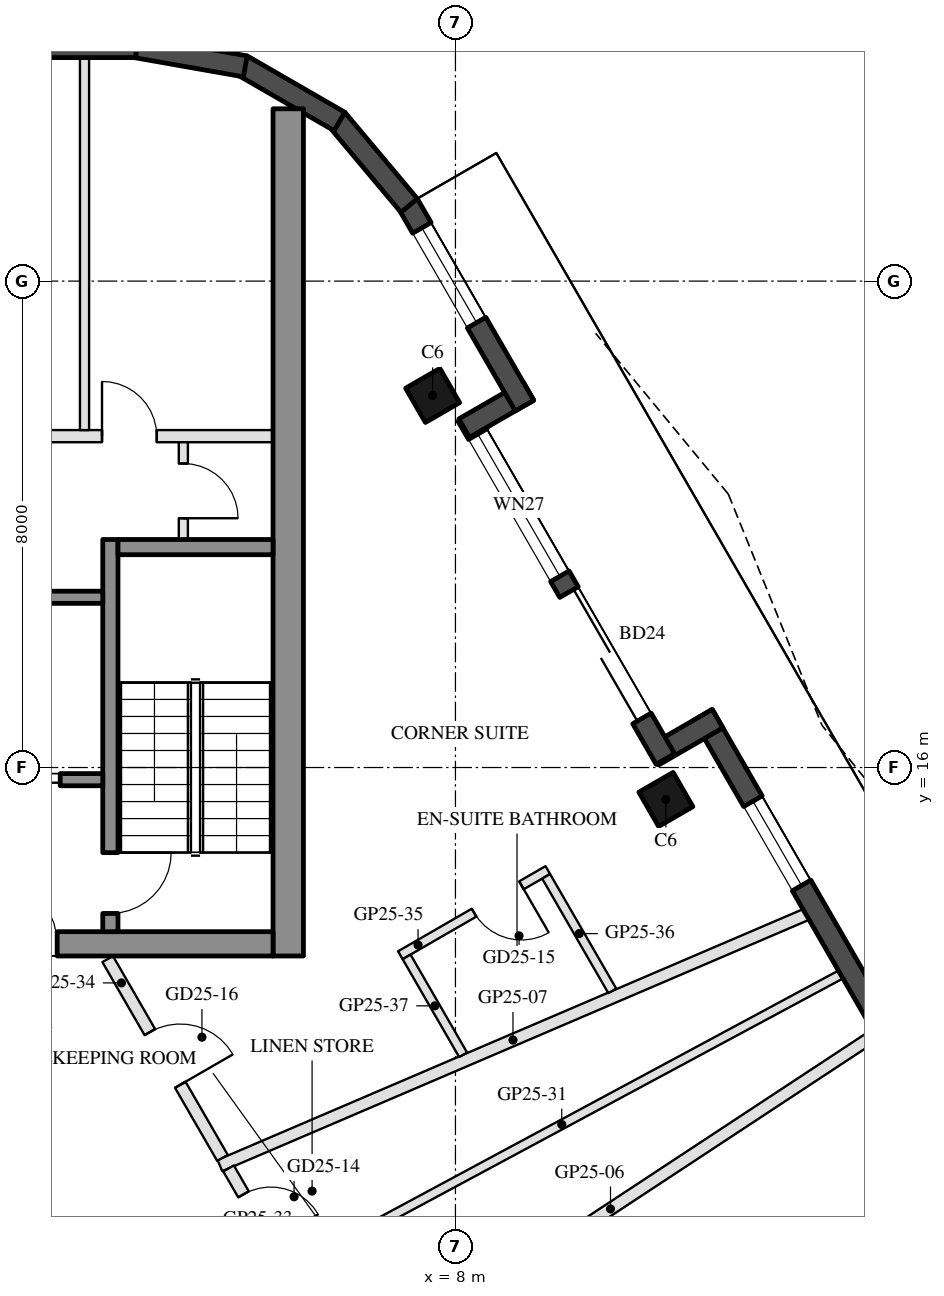
"""IFC4 building model, lengths in metres.
Left out: names, types, materials, properties, quantities, classifications, styles, units other than length and angle.
Written with IfcOpenShell. Run it as: python <this file> out.ifc"""

import sys

from ifc_helpers import new_model, si_unit, direction, frame, frame_2d, origin, origin_2d, place, context, subcontext, project, spatial, rectangle, hollow_rectangle, extrude, boolean, halfspace, element, fill, save


model = new_model("IFC4")
c1 = context("Model", 3, precision=1e-05, world=origin(), true_north=direction((0.0, 1.0)))
c2 = subcontext(c1, "Body", "Model", "MODEL_VIEW")
j1 = project(units=[si_unit("LENGTHUNIT", "METRE"), si_unit("PLANEANGLEUNIT", "RADIAN")], contexts=[c1])
p1 = place(None, origin())
s1 = spatial("IfcSite", under=j1, at=p1, CompositionType="ELEMENT")
p2 = place(p1, origin())
s2 = spatial("IfcBuilding", under=s1, at=p2, CompositionType="ELEMENT")
p3 = place(p2, frame((0.0, 0.0, 261.5)))
s3 = spatial("IfcBuildingStorey", under=s2, at=p3, CompositionType="ELEMENT", Elevation=261.5)
p4 = place(p3, frame((11.461, 15.475, 0.0), z_axis=(0.0, 0.0, 1.0), x_axis=(-0.5, 0.866025403784, 0.0)))
e1 = element("IfcColumn", 1, at=p4, inside=s3, PredefinedType="COLUMN", context=c2, shape_type="SweptSolid", body=[
    boolean("DIFFERENCE", extrude(hollow_rectangle(XDim=0.65, YDim=0.65, WallThickness=0.03, at=origin_2d()), origin(), (0.0, 0.0, 1.0), 3.7), halfspace(frame((0.0, 0.0, 3.66), z_axis=(0.0, 0.0, 1.0), x_axis=(1.0, 0.0, 0.0)), False)),
])
p5 = place(p3, frame((7.625, 22.119, 0.0), z_axis=(0.0, 0.0, 1.0), x_axis=(-0.5, 0.866025403784, 0.0)))
e2 = element("IfcColumn", 2, at=p5, inside=s3, PredefinedType="COLUMN", context=c2, shape_type="SweptSolid", body=[
    boolean("DIFFERENCE", extrude(hollow_rectangle(XDim=0.65, YDim=0.65, WallThickness=0.03, at=origin_2d()), origin(), (0.0, 0.0, 1.0), 3.7), halfspace(frame((0.0, 0.0, 3.653), z_axis=(0.0, 0.0, 1.0), x_axis=(1.0, 0.0, 0.0)), False)),
])
p6 = place(p3, frame((16.807, 8.665, 0.0), z_axis=(0.0, 0.0, 1.0), x_axis=(-0.499992427901, 0.866029775494, 0.0)))
e3 = element("IfcWall", 3, at=p6, inside=s3, PredefinedType="SOLIDWALL", context=c2, shape_type="SweptSolid", body=[
    extrude(rectangle(XDim=9.472, YDim=0.35, at=frame_2d((4.736, 0.0))), origin(), (0.0, 0.0, 1.0), 3.55),
])
p7 = place(p6, frame((1.612, 0.0, 0.0)))
e4 = element("IfcOpeningElement", 4, at=p7, cuts=e3, PredefinedType="OPENING", context=c2, shape_type="SweptSolid", body=[
    extrude(rectangle(XDim=1.4, YDim=2.4, at=frame_2d((0.7, 1.2))), frame((0.0, 0.185, 0.0), z_axis=(0.0, -1.0, 0.0), x_axis=(1.0, 0.0, 0.0)), (0.0, 0.0, 1.0), 0.37),
])
p8 = place(p6, frame((6.23, 0.0, 0.3)))
e5 = element("IfcOpeningElement", 5, at=p8, cuts=e3, PredefinedType="OPENING", context=c2, shape_type="SweptSolid", body=[
    extrude(rectangle(XDim=1.6, YDim=2.65, at=frame_2d((0.8, 1.325))), frame((0.0, 0.185, 0.0), z_axis=(0.0, -1.0, 0.0), x_axis=(1.0, 0.0, 0.0)), (0.0, 0.0, 1.0), 0.37),
])
p9 = place(p3, frame((12.311, 16.803, 0.0), z_axis=(0.0, 0.0, 1.0), x_axis=(-0.866005645448, -0.500034220881, 0.0)))
e6 = element("IfcWall", 6, at=p9, inside=s3, PredefinedType="SOLIDWALL", context=c2, shape_type="SweptSolid", body=[
    extrude(rectangle(XDim=1.22, YDim=0.35, at=frame_2d((0.61, 0.0))), origin(), (0.0, 0.0, 1.0), 3.55),
])
p10 = place(p3, frame((11.452, 16.14, 0.0), z_axis=(0.0, 0.0, 1.0), x_axis=(-0.49998210071, 0.866035737698, 0.0)))
e7 = element("IfcWall", 7, at=p10, inside=s3, PredefinedType="SOLIDWALL", context=c2, shape_type="SweptSolid", body=[
    extrude(rectangle(XDim=6.511, YDim=0.35, at=frame_2d((3.256, 0.0))), origin(), (0.0, 0.0, 1.0), 3.55),
])
p11 = place(p10, frame((0.77, 0.0, 0.0)))
e8 = element("IfcOpeningElement", 8, at=p11, cuts=e7, PredefinedType="OPENING", context=c2, shape_type="SweptSolid", body=[
    extrude(rectangle(XDim=2.4, YDim=2.4, at=frame_2d((1.2, 1.2))), frame((0.0, 0.185, 0.0), z_axis=(0.0, -1.0, 0.0), x_axis=(1.0, 0.0, 0.0)), (0.0, 0.0, 1.0), 0.37),
])
p12 = place(p10, frame((3.47, 0.0, 0.3)))
e9 = element("IfcOpeningElement", 9, at=p12, cuts=e7, PredefinedType="OPENING", context=c2, shape_type="SweptSolid", body=[
    extrude(rectangle(XDim=2.7, YDim=2.65, at=frame_2d((1.35, 1.325))), frame((0.0, 0.185, 0.0), z_axis=(0.0, -1.0, 0.0), x_axis=(1.0, 0.0, 0.0)), (0.0, 0.0, 1.0), 0.37),
])
p13 = place(p3, frame((8.143, 21.582, 0.0), z_axis=(0.0, 0.0, 1.0), x_axis=(0.866092288191, 0.499884134912, 0.0)))
e10 = element("IfcWall", 10, at=p13, inside=s3, PredefinedType="SOLIDWALL", context=c2, shape_type="SweptSolid", body=[
    extrude(rectangle(XDim=1.22, YDim=0.35, at=frame_2d((0.61, 0.0))), origin(), (0.0, 0.0, 1.0), 3.55),
])
p14 = place(p3, frame((9.135, 21.952, 0.0), z_axis=(0.0, 0.0, 1.0), x_axis=(-0.499972675833, 0.866041178825, 0.0)))
e11 = element("IfcWall", 11, at=p14, inside=s3, PredefinedType="SOLIDWALL", context=c2, shape_type="SweptSolid", body=[
    extrude(rectangle(XDim=3.829, YDim=0.35, at=frame_2d((1.915, 0.0))), origin(), (0.0, 0.0, 1.0), 3.55),
])
p15 = place(p14, frame((1.575, 0.0, 0.3)))
e12 = element("IfcOpeningElement", 12, at=p15, cuts=e11, PredefinedType="OPENING", context=c2, shape_type="SweptSolid", body=[
    extrude(rectangle(XDim=1.8, YDim=2.65, at=frame_2d((0.9, 1.325))), frame((0.0, 0.185, 0.0), z_axis=(0.0, -1.0, 0.0), x_axis=(1.0, 0.0, 0.0)), (0.0, 0.0, 1.0), 0.37),
])
p16 = place(p3, frame((7.239, 25.243, 0.0), z_axis=(0.0, 0.0, 1.0), x_axis=(-0.642756798522, 0.7660702957, 0.0)))
e13 = element("IfcWall", 13, at=p16, inside=s3, PredefinedType="SOLIDWALL", context=c2, shape_type="SweptSolid", body=[
    extrude(rectangle(XDim=1.855, YDim=0.35, at=frame_2d((0.928, 0.0))), origin(), (0.0, 0.0, 1.0), 3.55),
])
p17 = place(p3, frame((6.093, 26.625, 0.0), z_axis=(0.0, 0.0, 1.0), x_axis=(-0.866080385203, 0.499904757295, 0.0)))
e14 = element("IfcWall", 14, at=p17, inside=s3, PredefinedType="SOLIDWALL", context=c2, shape_type="SweptSolid", body=[
    extrude(rectangle(XDim=1.855, YDim=0.35, at=frame_2d((0.927, 0.0))), origin(), (0.0, 0.0, 1.0), 3.55),
])
p18 = place(p3, frame((4.544, 27.532, 0.0), z_axis=(0.0, 0.0, 1.0), x_axis=(-0.984795480386, 0.173717764815, 0.0)))
e15 = element("IfcWall", 15, at=p18, inside=s3, PredefinedType="SOLIDWALL", context=c2, shape_type="SweptSolid", body=[
    extrude(rectangle(XDim=1.855, YDim=0.35, at=frame_2d((0.928, 0.0))), origin(), (0.0, 0.0, 1.0), 3.55),
])
p19 = place(p3, frame((2.747, 27.851, 0.0), z_axis=(0.0, 0.0, 1.0), x_axis=(-1.0, 0.0, 0.0)))
e16 = element("IfcWall", 16, at=p19, inside=s3, PredefinedType="SOLIDWALL", context=c2, shape_type="SweptSolid", body=[
    extrude(rectangle(XDim=5.495, YDim=0.35, at=frame_2d((2.747, 0.0))), origin(), (0.0, 0.0, 1.0), 3.55),
])
p20 = place(p3, frame((5.25, 12.9, 0.0), z_axis=(0.0, 0.0, 1.0), x_axis=(0.0, 1.0, 0.0)))
e17 = element("IfcWall", 17, at=p20, inside=s3, PredefinedType="SHEAR", context=c2, shape_type="SweptSolid", body=[
    extrude(rectangle(XDim=13.934, YDim=0.5, at=frame_2d((6.967, 0.0))), origin(), (0.0, 0.0, 1.0), 3.5),
])
p21 = place(p3, frame((5.0, 13.1, 0.0), z_axis=(0.0, 0.0, 1.0), x_axis=(-1.0, 0.0, 0.0)))
e18 = element("IfcWall", 18, at=p21, inside=s3, PredefinedType="SHEAR", context=c2, shape_type="SweptSolid", body=[
    extrude(rectangle(XDim=10.0, YDim=0.4, at=frame_2d((5.0, 0.0))), origin(), (0.0, 0.0, 1.0), 3.5),
])
p22 = place(p21, frame((3.55, 0.0, 0.0)))
e19 = element("IfcOpeningElement", 19, at=p22, cuts=e18, PredefinedType="OPENING", context=c2, shape_type="SweptSolid", body=[
    extrude(rectangle(XDim=1.1, YDim=2.1, at=frame_2d((0.55, 1.05))), frame((0.0, 0.21, 0.0), z_axis=(0.0, -1.0, 0.0), x_axis=(1.0, 0.0, 0.0)), (0.0, 0.0, 1.0), 0.42),
])
p23 = place(p21, frame((5.85, 0.0, 0.0)))
e20 = element("IfcOpeningElement", 20, at=p23, cuts=e18, PredefinedType="OPENING", context=c2, shape_type="SweptSolid", body=[
    extrude(rectangle(XDim=1.4, YDim=2.1, at=frame_2d((0.7, 1.05))), frame((0.0, 0.21, 0.0), z_axis=(0.0, -1.0, 0.0), x_axis=(1.0, 0.0, 0.0)), (0.0, 0.0, 1.0), 0.42),
])
p24 = place(p3, frame((2.325, 13.3, 0.0), z_axis=(0.0, 0.0, 1.0), x_axis=(0.0, 1.0, 0.0)))
e21 = element("IfcWall", 21, at=p24, inside=s3, PredefinedType="SHEAR", context=c2, shape_type="SweptSolid", body=[
    extrude(rectangle(XDim=6.45, YDim=0.25, at=frame_2d((3.225, 0.0))), origin(), (0.0, 0.0, 1.0), 3.5),
])
p25 = place(p24, frame((0.3, 0.0, 0.0)))
e22 = element("IfcOpeningElement", 22, at=p25, cuts=e21, PredefinedType="OPENING", context=c2, shape_type="SweptSolid", body=[
    extrude(rectangle(XDim=1.0, YDim=2.1, at=frame_2d((0.5, 1.05))), frame((0.0, 0.135, 0.0), z_axis=(0.0, -1.0, 0.0), x_axis=(1.0, 0.0, 0.0)), (0.0, 0.0, 1.0), 0.27),
])
p26 = place(p3, frame((5.0, 19.625, 0.0), z_axis=(0.0, 0.0, 1.0), x_axis=(-1.0, 0.0, 0.0)))
e23 = element("IfcWall", 23, at=p26, inside=s3, PredefinedType="SHEAR", context=c2, shape_type="SweptSolid", body=[
    extrude(rectangle(XDim=2.55, YDim=0.25, at=frame_2d((1.275, 0.0))), origin(), (0.0, 0.0, 1.0), 3.5),
])
p27 = place(p3, frame((2.2, 18.8, 0.0), z_axis=(0.0, 0.0, 1.0), x_axis=(-1.0, 0.0, 0.0)))
e24 = element("IfcWall", 24, at=p27, inside=s3, PredefinedType="SHEAR", context=c2, shape_type="SweptSolid", body=[
    extrude(rectangle(XDim=2.8, YDim=0.2, at=frame_2d((1.4, 0.0))), origin(), (0.0, 0.0, 1.0), 3.5),
])
p28 = place(p3, frame((2.2, 15.8, 0.0), z_axis=(0.0, 0.0, 1.0), x_axis=(-1.0, 0.0, 0.0)))
e25 = element("IfcWall", 25, at=p28, inside=s3, PredefinedType="SHEAR", context=c2, shape_type="SweptSolid", body=[
    extrude(rectangle(XDim=2.8, YDim=0.2, at=frame_2d((1.4, 0.0))), origin(), (0.0, 0.0, 1.0), 3.5),
])
p29 = place(p28, frame((0.7, 0.0, 0.0)))
e26 = element("IfcOpeningElement", 26, at=p29, cuts=e25, PredefinedType="OPENING", context=c2, shape_type="SweptSolid", body=[
    extrude(rectangle(XDim=1.2, YDim=2.1, at=frame_2d((0.6, 1.05))), frame((0.0, 0.11, 0.0), z_axis=(0.0, -1.0, 0.0), x_axis=(1.0, 0.0, 0.0)), (0.0, 0.0, 1.0), 0.22),
])
p30 = place(p3, frame((5.0, 21.45, 0.0), z_axis=(0.0, 0.0, 1.0), x_axis=(-1.0, 0.0, 0.0)))
e27 = element("IfcWall", 27, at=p30, inside=s3, PredefinedType="PARTITIONING", context=c2, shape_type="SweptSolid", body=[
    extrude(rectangle(XDim=5.4, YDim=0.2, at=frame_2d((2.7, 0.0))), origin(), (0.0, 0.0, 1.0), 3.5),
])
p31 = place(p30, frame((1.913, 0.0, 0.0)))
e28 = element("IfcOpeningElement", 28, at=p31, cuts=e27, PredefinedType="OPENING", context=c2, shape_type="SweptSolid", body=[
    extrude(rectangle(XDim=0.9, YDim=2.1, at=frame_2d((0.45, 1.05))), frame((0.0, 0.11, 0.0), z_axis=(0.0, -1.0, 0.0), x_axis=(1.0, 0.0, 0.0)), (0.0, 0.0, 1.0), 0.22),
])
p32 = place(p30, frame((3.788, 0.0, 0.0)))
e29 = element("IfcOpeningElement", 29, at=p32, cuts=e27, PredefinedType="OPENING", context=c2, shape_type="SweptSolid", body=[
    extrude(rectangle(XDim=0.9, YDim=2.1, at=frame_2d((0.45, 1.05))), frame((0.0, 0.11, 0.0), z_axis=(0.0, -1.0, 0.0), x_axis=(1.0, 0.0, 0.0)), (0.0, 0.0, 1.0), 0.22),
])
p33 = place(p3, frame((3.525, 19.75, 0.0), z_axis=(0.0, 0.0, 1.0), x_axis=(0.0, 1.0, 0.0)))
e30 = element("IfcWall", 30, at=p33, inside=s3, PredefinedType="PARTITIONING", context=c2, shape_type="SweptSolid", body=[
    extrude(rectangle(XDim=1.6, YDim=0.15, at=frame_2d((0.8, 0.0))), origin(), (0.0, 0.0, 1.0), 3.5),
])
p34 = place(p33, frame((0.35, 0.0, 0.0)))
e31 = element("IfcOpeningElement", 31, at=p34, cuts=e30, PredefinedType="OPENING", context=c2, shape_type="SweptSolid", body=[
    extrude(rectangle(XDim=0.9, YDim=2.1, at=frame_2d((0.45, 1.05))), frame((0.0, 0.085, 0.0), z_axis=(0.0, -1.0, 0.0), x_axis=(1.0, 0.0, 0.0)), (0.0, 0.0, 1.0), 0.17),
])
p35 = place(p3, frame((1.9, 21.55, 0.0), z_axis=(0.0, 0.0, 1.0), x_axis=(0.0, 1.0, 0.0)))
e32 = element("IfcWall", 32, at=p35, inside=s3, PredefinedType="PARTITIONING", context=c2, shape_type="SweptSolid", body=[
    extrude(rectangle(XDim=6.126, YDim=0.15, at=frame_2d((3.063, 0.0))), origin(), (0.0, 0.0, 1.0), 3.5),
])
p36 = place(p3, frame((14.906, 11.608, 0.0), z_axis=(0.0, 0.0, 1.0), x_axis=(-0.835212554653, -0.549927257507, 0.0)))
e33 = element("IfcWall", 33, at=p36, inside=s3, PredefinedType="PARTITIONING", context=c2, shape_type="SweptSolid", body=[
    extrude(rectangle(XDim=10.431, YDim=0.2, at=frame_2d((5.216, 0.0))), origin(), (0.0, 0.0, 1.0), 3.1),
])
p37 = place(p3, frame((13.766, 13.583, 0.0), z_axis=(0.0, 0.0, 1.0), x_axis=(-0.919210042537, -0.393767568115, 0.0)))
e34 = element("IfcWall", 34, at=p37, inside=s3, PredefinedType="PARTITIONING", context=c2, shape_type="SweptSolid", body=[
    extrude(rectangle(XDim=10.487, YDim=0.2, at=frame_2d((5.243, 0.0))), origin(), (0.0, 0.0, 1.0), 3.1),
])
p38 = place(p3, frame((14.336, 12.595, 0.0), z_axis=(0.0, 0.0, 1.0), x_axis=(-0.880794466183, -0.473498794445, 0.0)))
e35 = element("IfcWall", 35, at=p38, inside=s3, PredefinedType="PARTITIONING", context=c2, shape_type="SweptSolid", body=[
    extrude(rectangle(XDim=10.418, YDim=0.15, at=frame_2d((5.209, 0.0))), origin(), (0.0, 0.0, 1.0), 3.0),
])
p39 = place(p3, frame((4.269, 9.406, 0.0), z_axis=(0.0, 0.0, 1.0), x_axis=(0.499973055223, -0.8660409598, 0.0)))
e36 = element("IfcWall", 36, at=p39, inside=s3, PredefinedType="PARTITIONING", context=c2, shape_type="SweptSolid", body=[
    extrude(rectangle(XDim=1.883, YDim=0.2, at=frame_2d((0.942, 0.0))), origin(), (0.0, 0.0, 1.0), 3.55),
])
p40 = place(p39, frame((0.492, 0.0, 0.0)))
e37 = element("IfcOpeningElement", 37, at=p40, cuts=e36, PredefinedType="OPENING", context=c2, shape_type="SweptSolid", body=[
    extrude(rectangle(XDim=0.9, YDim=2.1, at=frame_2d((0.45, 1.05))), frame((0.0, 0.11, 0.0), z_axis=(0.0, -1.0, 0.0), x_axis=(1.0, 0.0, 0.0)), (0.0, 0.0, 1.0), 0.22),
])
p41 = place(p3, frame((2.281, 12.85, 0.0), z_axis=(0.0, 0.0, 1.0), x_axis=(0.499978071388, -0.866038063904, 0.0)))
e38 = element("IfcWall", 38, at=p41, inside=s3, PredefinedType="PARTITIONING", context=c2, shape_type="SweptSolid", body=[
    extrude(rectangle(XDim=3.776, YDim=0.2, at=frame_2d((1.888, 0.0))), origin(), (0.0, 0.0, 1.0), 3.0),
])
p42 = place(p41, frame((1.388, 0.0, 0.0)))
e39 = element("IfcOpeningElement", 39, at=p42, cuts=e38, PredefinedType="OPENING", context=c2, shape_type="SweptSolid", body=[
    extrude(rectangle(XDim=1.0, YDim=2.1, at=frame_2d((0.5, 1.05))), frame((0.0, 0.11, 0.0), z_axis=(0.0, -1.0, 0.0), x_axis=(1.0, 0.0, 0.0)), (0.0, 0.0, 1.0), 0.22),
])
p43 = place(p3, frame((9.519, 14.313, 0.0), z_axis=(0.0, 0.0, 1.0), x_axis=(-0.865996816683, -0.500049511043, 0.0)))
e40 = element("IfcWall", 40, at=p43, inside=s3, PredefinedType="PARTITIONING", context=c2, shape_type="SweptSolid", body=[
    extrude(rectangle(XDim=2.8, YDim=0.15, at=frame_2d((1.4, 0.0))), origin(), (0.0, 0.0, 1.0), 3.0),
])
p44 = place(p43, frame((0.5, 0.0, 0.0)))
e41 = element("IfcOpeningElement", 41, at=p44, cuts=e40, PredefinedType="OPENING", context=c2, shape_type="SweptSolid", body=[
    extrude(rectangle(XDim=0.9, YDim=2.1, at=frame_2d((0.45, 1.05))), frame((0.0, 0.085, 0.0), z_axis=(0.0, -1.0, 0.0), x_axis=(1.0, 0.0, 0.0)), (0.0, 0.0, 1.0), 0.17),
])
p45 = place(p3, frame((10.579, 12.326, 0.0), z_axis=(0.0, 0.0, 1.0), x_axis=(-0.499965319569, 0.866045425615, 0.0)))
e42 = element("IfcWall", 42, at=p45, inside=s3, PredefinedType="PARTITIONING", context=c2, shape_type="SweptSolid", body=[
    extrude(rectangle(XDim=2.176, YDim=0.15, at=frame_2d((1.088, 0.0))), origin(), (0.0, 0.0, 1.0), 3.55),
])
p46 = place(p3, frame((8.126, 11.276, 0.0), z_axis=(0.0, 0.0, 1.0), x_axis=(-0.500093796661, 0.865971243484, 0.0)))
e43 = element("IfcWall", 43, at=p46, inside=s3, PredefinedType="PARTITIONING", context=c2, shape_type="SweptSolid", body=[
    extrude(rectangle(XDim=1.859, YDim=0.15, at=frame_2d((0.93, 0.0))), origin(), (0.0, 0.0, 1.0), 3.55),
])
p47 = place(p8, origin())
e44 = element("IfcWindow", 44, at=p47, inside=s3, PartitioningType="SINGLE_PANEL", PredefinedType="WINDOW", context=c2, shape_type="SweptSolid", body=[
    extrude(rectangle(XDim=1.6, YDim=2.65, at=frame_2d((0.8, 1.325))), frame((0.0, 0.03, 0.0), z_axis=(0.0, -1.0, 0.0), x_axis=(1.0, 0.0, 0.0)), (0.0, 0.0, 1.0), 0.06),
])
fill(e5, e44)
p48 = place(p11, frame((2.4, 0.0, 0.0), z_axis=(0.0, 0.0, 1.0), x_axis=(-1.0, 0.0, 0.0)))
e45 = element("IfcDoor", 45, at=p48, inside=s3, OperationType="SLIDING_TO_LEFT", PredefinedType="DOOR", context=c2, shape_type="SweptSolid", body=[
    extrude(rectangle(XDim=2.4, YDim=2.4, at=frame_2d((1.2, 1.2))), frame((0.0, 0.025, 0.0), z_axis=(0.0, -1.0, 0.0), x_axis=(1.0, 0.0, 0.0)), (0.0, 0.0, 1.0), 0.05),
])
fill(e8, e45)
p49 = place(p12, origin())
e46 = element("IfcWindow", 46, at=p49, inside=s3, PartitioningType="SINGLE_PANEL", PredefinedType="WINDOW", context=c2, shape_type="SweptSolid", body=[
    extrude(rectangle(XDim=2.7, YDim=2.65, at=frame_2d((1.35, 1.325))), frame((0.0, 0.03, 0.0), z_axis=(0.0, -1.0, 0.0), x_axis=(1.0, 0.0, 0.0)), (0.0, 0.0, 1.0), 0.06),
])
fill(e9, e46)
p50 = place(p15, origin())
e47 = element("IfcWindow", 47, at=p50, inside=s3, PartitioningType="SINGLE_PANEL", PredefinedType="WINDOW", context=c2, shape_type="SweptSolid", body=[
    extrude(rectangle(XDim=1.8, YDim=2.65, at=frame_2d((0.9, 1.325))), frame((0.0, 0.03, 0.0), z_axis=(0.0, -1.0, 0.0), x_axis=(1.0, 0.0, 0.0)), (0.0, 0.0, 1.0), 0.06),
])
fill(e12, e47)
p51 = place(p29, origin())
e48 = element("IfcDoor", 48, at=p51, inside=s3, OperationType="DOUBLE_DOOR_SLIDING", PredefinedType="DOOR", context=c2, shape_type="SweptSolid", body=[
    extrude(rectangle(XDim=1.2, YDim=2.1, at=frame_2d((0.6, 1.05))), frame((0.0, 0.025, 0.0), z_axis=(0.0, -1.0, 0.0), x_axis=(1.0, 0.0, 0.0)), (0.0, 0.0, 1.0), 0.05),
])
fill(e26, e48)
p52 = place(p34, frame((0.9, 0.0, 0.0), z_axis=(0.0, 0.0, 1.0), x_axis=(-1.0, 0.0, 0.0)))
e49 = element("IfcDoor", 49, at=p52, inside=s3, OperationType="SINGLE_SWING_RIGHT", PredefinedType="DOOR", context=c2, shape_type="SweptSolid", body=[
    extrude(rectangle(XDim=0.9, YDim=2.1, at=frame_2d((0.45, 1.05))), frame((0.0, 0.025, 0.0), z_axis=(0.0, -1.0, 0.0), x_axis=(1.0, 0.0, 0.0)), (0.0, 0.0, 1.0), 0.05),
])
fill(e31, e49)
p53 = place(p31, frame((0.9, 0.0, 0.0), z_axis=(0.0, 0.0, 1.0), x_axis=(-1.0, 0.0, 0.0)))
e50 = element("IfcDoor", 50, at=p53, inside=s3, OperationType="SINGLE_SWING_LEFT", PredefinedType="DOOR", context=c2, shape_type="SweptSolid", body=[
    extrude(rectangle(XDim=0.9, YDim=2.1, at=frame_2d((0.45, 1.05))), frame((0.0, 0.025, 0.0), z_axis=(0.0, -1.0, 0.0), x_axis=(1.0, 0.0, 0.0)), (0.0, 0.0, 1.0), 0.05),
])
fill(e28, e50)
p54 = place(p22, frame((1.1, 0.0, 0.0), z_axis=(0.0, 0.0, 1.0), x_axis=(-1.0, 0.0, 0.0)))
e51 = element("IfcDoor", 51, at=p54, inside=s3, OperationType="SINGLE_SWING_LEFT", PredefinedType="DOOR", context=c2, shape_type="SweptSolid", body=[
    extrude(rectangle(XDim=1.1, YDim=2.1, at=frame_2d((0.55, 1.05))), frame((0.0, 0.025, 0.0), z_axis=(0.0, -1.0, 0.0), x_axis=(1.0, 0.0, 0.0)), (0.0, 0.0, 1.0), 0.05),
])
fill(e19, e51)
p55 = place(p25, frame((1.0, 0.0, 0.0), z_axis=(0.0, 0.0, 1.0), x_axis=(-1.0, 0.0, 0.0)))
e52 = element("IfcDoor", 52, at=p55, inside=s3, OperationType="SINGLE_SWING_LEFT", PredefinedType="DOOR", context=c2, shape_type="SweptSolid", body=[
    extrude(rectangle(XDim=1.0, YDim=2.1, at=frame_2d((0.5, 1.05))), frame((0.0, 0.025, 0.0), z_axis=(0.0, -1.0, 0.0), x_axis=(1.0, 0.0, 0.0)), (0.0, 0.0, 1.0), 0.05),
])
fill(e22, e52)
p56 = place(p40, origin())
e53 = element("IfcDoor", 53, at=p56, inside=s3, OperationType="SINGLE_SWING_RIGHT", PredefinedType="DOOR", context=c2, shape_type="SweptSolid", body=[
    extrude(rectangle(XDim=0.9, YDim=2.1, at=frame_2d((0.45, 1.05))), frame((0.0, 0.025, 0.0), z_axis=(0.0, -1.0, 0.0), x_axis=(1.0, 0.0, 0.0)), (0.0, 0.0, 1.0), 0.05),
])
fill(e37, e53)
p57 = place(p44, origin())
e54 = element("IfcDoor", 54, at=p57, inside=s3, OperationType="SINGLE_SWING_LEFT", PredefinedType="DOOR", context=c2, shape_type="SweptSolid", body=[
    extrude(rectangle(XDim=0.9, YDim=2.1, at=frame_2d((0.45, 1.05))), frame((0.0, 0.025, 0.0), z_axis=(0.0, -1.0, 0.0), x_axis=(1.0, 0.0, 0.0)), (0.0, 0.0, 1.0), 0.05),
])
fill(e41, e54)
p58 = place(p42, origin())
e55 = element("IfcDoor", 55, at=p58, inside=s3, OperationType="SINGLE_SWING_RIGHT", PredefinedType="DOOR", context=c2, shape_type="SweptSolid", body=[
    extrude(rectangle(XDim=1.0, YDim=2.1, at=frame_2d((0.5, 1.05))), frame((0.0, 0.025, 0.0), z_axis=(0.0, -1.0, 0.0), x_axis=(1.0, 0.0, 0.0)), (0.0, 0.0, 1.0), 0.05),
])
fill(e39, e55)
save(model, sys.argv[1])
